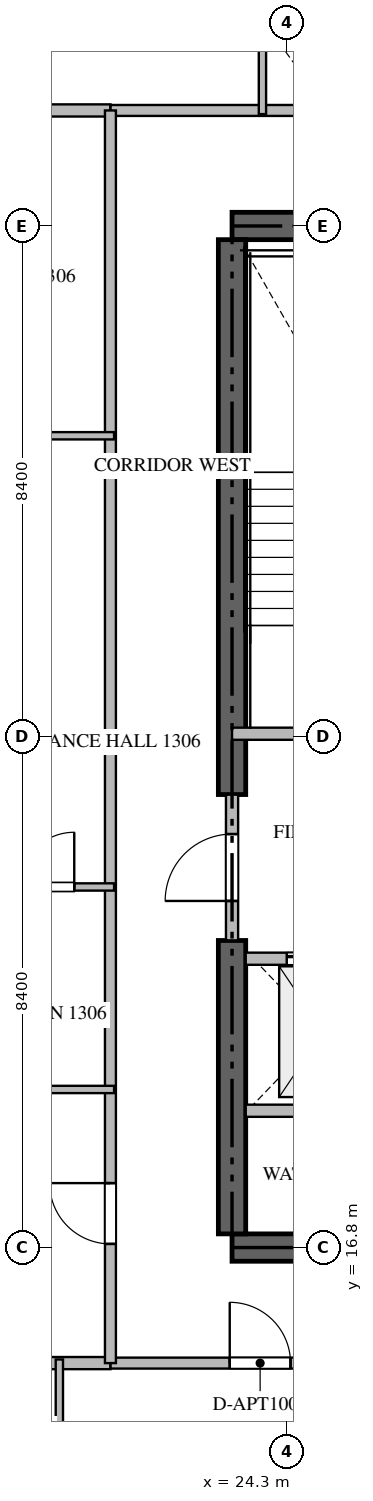
"""IFC4 building model, lengths in metres.
Left out: names, types, materials, properties, quantities, classifications, styles, units other than length and angle.
Written with IfcOpenShell. Run it as: python <this file> out.ifc"""

import sys

from ifc_helpers import new_model, si_unit, direction, frame, frame_2d, origin, place, context, subcontext, project, spatial, rectangle, extrude, source, transform, mapped, element, fill, save


model = new_model("IFC4")
c1 = context("Model", 3, precision=1e-05, world=origin(), true_north=direction((0.0, 1.0)))
c2 = subcontext(c1, "Body", "Model", "MODEL_VIEW")
j1 = project(units=[si_unit("LENGTHUNIT", "METRE"), si_unit("PLANEANGLEUNIT", "RADIAN")], contexts=[c1])
p1 = place(None, origin())
s1 = spatial("IfcSite", under=j1, at=p1, CompositionType="ELEMENT")
p2 = place(p1, origin())
s2 = spatial("IfcBuilding", under=s1, at=p2, CompositionType="ELEMENT")
p3 = place(p2, frame((0.0, 0.0, 56.7)))
s3 = spatial("IfcBuildingStorey", under=s2, at=p3, CompositionType="ELEMENT", Elevation=56.7)
for number, where, z_axis, x_axis in (
    (1, (23.4, 16.8, -0.26), (0.0, 0.0, 1.0), (1.0, 0.0, 0.0)),
    (2, (41.4, 33.6, -0.26), (0.0, 0.0, 1.0), (-1.0, 0.0, 0.0)),
):
    element("IfcWall", number, at=place(p3, frame(where, z_axis=z_axis, x_axis=x_axis)), inside=s3, PredefinedType="SHEAR", context=c2, shape_type="SweptSolid", body=[
        extrude(rectangle(XDim=18.0, YDim=0.45, at=frame_2d((9.0, 0.0))), origin(), (0.0, 0.0, 1.0), 3.748),
    ])
p4 = place(p3, frame((23.4, 17.025, -0.26), z_axis=(0.0, 0.0, 1.0), x_axis=(0.0, 1.0, 0.0)))
e3 = element("IfcWall", 3, at=p4, inside=s3, PredefinedType="SHEAR", context=c2, shape_type="SweptSolid", body=[
    extrude(rectangle(XDim=4.825, YDim=0.45, at=frame_2d((2.413, 0.0))), origin(), (0.0, 0.0, 1.0), 3.748),
])
p5 = place(p3, frame((23.4, 24.25, -0.26), z_axis=(0.0, 0.0, 1.0), x_axis=(0.0, 1.0, 0.0)))
e4 = element("IfcWall", 4, at=p5, inside=s3, PredefinedType="SHEAR", context=c2, shape_type="SweptSolid", body=[
    extrude(rectangle(XDim=9.125, YDim=0.45, at=frame_2d((4.562, 0.0))), origin(), (0.0, 0.0, 1.0), 3.748),
])
p6 = place(p3, frame((23.4, 25.25, 0.0), z_axis=(0.0, 0.0, 1.0), x_axis=(1.0, 0.0, 0.0)))
e5 = element("IfcWall", 5, at=p6, inside=s3, PredefinedType="STANDARD", context=c2, shape_type="SweptSolid", body=[
    extrude(rectangle(XDim=4.45, YDim=0.2, at=frame_2d((2.225, 0.0))), origin(), (0.0, 0.0, 1.0), 3.49),
])
p7 = place(p6, frame((1.65, 0.0, 0.0)))
e6 = element("IfcOpeningElement", 6, at=p7, cuts=e5, PredefinedType="OPENING", context=c2, shape_type="SweptSolid", body=[
    extrude(rectangle(XDim=1.1, YDim=2.15, at=frame_2d((0.55, 1.075))), frame((0.0, 0.11, 0.0), z_axis=(0.0, -1.0, 0.0), x_axis=(1.0, 0.0, 0.0)), (0.0, 0.0, 1.0), 0.22),
])
p8 = place(p3, frame((23.625, 21.55, 0.0), z_axis=(0.0, 0.0, 1.0), x_axis=(1.0, 0.0, 0.0)))
e7 = element("IfcWall", 7, at=p8, inside=s3, PredefinedType="STANDARD", context=c2, shape_type="SweptSolid", body=[
    extrude(rectangle(XDim=2.425, YDim=0.2, at=frame_2d((1.212, 0.0))), origin(), (0.0, 0.0, 1.0), 3.49),
])
p9 = place(p8, frame((0.675, 0.0, 0.0)))
e8 = element("IfcOpeningElement", 8, at=p9, cuts=e7, PredefinedType="OPENING", context=c2, shape_type="SweptSolid", body=[
    extrude(rectangle(XDim=1.2, YDim=2.2, at=frame_2d((0.6, 1.1))), frame((0.0, 0.11, 0.0), z_axis=(0.0, -1.0, 0.0), x_axis=(1.0, 0.0, 0.0)), (0.0, 0.0, 1.0), 0.22),
])
p10 = place(p3, frame((23.625, 19.05, 0.0), z_axis=(0.0, 0.0, 1.0), x_axis=(1.0, 0.0, 0.0)))
e9 = element("IfcWall", 9, at=p10, inside=s3, PredefinedType="STANDARD", context=c2, shape_type="SweptSolid", body=[
    extrude(rectangle(XDim=2.425, YDim=0.2, at=frame_2d((1.212, 0.0))), origin(), (0.0, 0.0, 1.0), 3.49),
])
p11 = place(p3, frame((23.4, 21.852, 0.0), z_axis=(0.0, 0.0, 1.0), x_axis=(0.0, 1.0, 0.0)))
e10 = element("IfcWall", 10, at=p11, inside=s3, PredefinedType="STANDARD", context=c2, shape_type="SweptSolid", body=[
    extrude(rectangle(XDim=2.396, YDim=0.2, at=frame_2d((1.198, 0.0))), origin(), (0.0, 0.0, 1.0), 3.49),
])
p12 = place(p11, frame((0.648, 0.0, 0.0)))
e11 = element("IfcOpeningElement", 11, at=p12, cuts=e10, PredefinedType="OPENING", context=c2, shape_type="SweptSolid", body=[
    extrude(rectangle(XDim=1.1, YDim=2.15, at=frame_2d((0.55, 1.075))), frame((0.0, 0.11, 0.0), z_axis=(0.0, -1.0, 0.0), x_axis=(1.0, 0.0, 0.0)), (0.0, 0.0, 1.0), 0.22),
])
for number, where, z_axis, x_axis in (
    (12, (6.082, 14.9, 0.0), (0.0, 0.0, 1.0), (1.0, 0.0, 0.0)),
    (13, (6.082, 35.5, 0.0), (0.0, 0.0, 1.0), (1.0, 0.0, 0.0)),
):
    element("IfcWall", number, at=place(p3, frame(where, z_axis=z_axis, x_axis=x_axis)), inside=s3, PredefinedType="PARTITIONING", context=c2, shape_type="SweptSolid", body=[
        extrude(rectangle(XDim=15.318, YDim=0.2, at=frame_2d((7.659, 0.0))), origin(), (0.0, 0.0, 1.0), 3.49),
    ])
p13 = place(p3, frame((21.402, 14.9, 0.0), z_axis=(0.0, 0.0, 1.0), x_axis=(1.0, 0.0, 0.0)))
e14 = element("IfcWall", 14, at=p13, inside=s3, PredefinedType="PARTITIONING", context=c2, shape_type="SweptSolid", body=[
    extrude(rectangle(XDim=21.996, YDim=0.18, at=frame_2d((10.998, 0.0))), origin(), (0.0, 0.0, 1.0), 3.49),
])
p14 = place(p13, frame((1.96, 0.0, 0.0)))
e15 = element("IfcOpeningElement", 15, at=p14, cuts=e14, PredefinedType="OPENING", context=c2, shape_type="SweptSolid", body=[
    extrude(rectangle(XDim=1.0, YDim=2.15, at=frame_2d((0.5, 1.075))), frame((0.0, 0.1, 0.0), z_axis=(0.0, -1.0, 0.0), x_axis=(1.0, 0.0, 0.0)), (0.0, 0.0, 1.0), 0.2),
])
p15 = place(p13, frame((5.249, 0.0, 0.0)))
e16 = element("IfcOpeningElement", 16, at=p15, cuts=e14, PredefinedType="OPENING", context=c2, shape_type="SweptSolid", body=[
    extrude(rectangle(XDim=1.0, YDim=2.15, at=frame_2d((0.5, 1.075))), frame((0.0, 0.1, 0.0), z_axis=(0.0, -1.0, 0.0), x_axis=(1.0, 0.0, 0.0)), (0.0, 0.0, 1.0), 0.2),
])
p16 = place(p13, frame((11.653, 0.0, 0.0)))
e17 = element("IfcOpeningElement", 17, at=p16, cuts=e14, PredefinedType="OPENING", context=c2, shape_type="SweptSolid", body=[
    extrude(rectangle(XDim=1.0, YDim=2.15, at=frame_2d((0.5, 1.075))), frame((0.0, 0.1, 0.0), z_axis=(0.0, -1.0, 0.0), x_axis=(1.0, 0.0, 0.0)), (0.0, 0.0, 1.0), 0.2),
])
p17 = place(p13, frame((18.896, 0.0, 0.0)))
e18 = element("IfcOpeningElement", 18, at=p17, cuts=e14, PredefinedType="OPENING", context=c2, shape_type="SweptSolid", body=[
    extrude(rectangle(XDim=1.0, YDim=2.15, at=frame_2d((0.5, 1.075))), frame((0.0, 0.1, 0.0), z_axis=(0.0, -1.0, 0.0), x_axis=(1.0, 0.0, 0.0)), (0.0, 0.0, 1.0), 0.2),
])
p18 = place(p3, frame((21.402, 35.5, 0.0), z_axis=(0.0, 0.0, 1.0), x_axis=(1.0, 0.0, 0.0)))
e19 = element("IfcWall", 19, at=p18, inside=s3, PredefinedType="PARTITIONING", context=c2, shape_type="SweptSolid", body=[
    extrude(rectangle(XDim=21.996, YDim=0.18, at=frame_2d((10.998, 0.0))), origin(), (0.0, 0.0, 1.0), 3.49),
])
p19 = place(p18, frame((15.222, 0.0, 0.0)))
e20 = element("IfcOpeningElement", 20, at=p19, cuts=e19, PredefinedType="OPENING", context=c2, shape_type="SweptSolid", body=[
    extrude(rectangle(XDim=1.0, YDim=2.15, at=frame_2d((0.5, 1.075))), frame((0.0, 0.1, 0.0), z_axis=(0.0, -1.0, 0.0), x_axis=(1.0, 0.0, 0.0)), (0.0, 0.0, 1.0), 0.2),
])
p20 = place(p3, frame((21.4, 14.9, 0.0), z_axis=(0.0, 0.0, 1.0), x_axis=(0.0, 1.0, 0.0)))
e21 = element("IfcWall", 21, at=p20, inside=s3, PredefinedType="PARTITIONING", context=c2, shape_type="SweptSolid", body=[
    extrude(rectangle(XDim=20.6, YDim=0.18, at=frame_2d((10.3, 0.0))), origin(), (0.0, 0.0, 1.0), 3.49),
])
p21 = place(p20, frame((1.96, 0.0, 0.0)))
e22 = element("IfcOpeningElement", 22, at=p21, cuts=e21, PredefinedType="OPENING", context=c2, shape_type="SweptSolid", body=[
    extrude(rectangle(XDim=1.0, YDim=2.15, at=frame_2d((0.5, 1.075))), frame((0.0, 0.1, 0.0), z_axis=(0.0, -1.0, 0.0), x_axis=(1.0, 0.0, 0.0)), (0.0, 0.0, 1.0), 0.2),
])
p22 = place(p3, frame((20.56, 12.15, 0.0), z_axis=(0.0, 0.0, 1.0), x_axis=(0.0, 1.0, 0.0)))
e23 = element("IfcWall", 23, at=p22, inside=s3, PredefinedType="PARTITIONING", context=c2, shape_type="SweptSolid", body=[
    extrude(rectangle(XDim=2.81, YDim=0.12, at=frame_2d((1.405, 0.0))), origin(), (0.0, 0.0, 1.0), 3.49),
])
p23 = place(p3, frame((23.9, 37.648, 0.0), z_axis=(0.0, 0.0, 1.0), x_axis=(0.0, -1.0, 0.0)))
e24 = element("IfcWall", 24, at=p23, inside=s3, PredefinedType="PARTITIONING", context=c2, shape_type="SweptSolid", body=[
    extrude(rectangle(XDim=2.208, YDim=0.12, at=frame_2d((1.104, 0.0))), origin(), (0.0, 0.0, 1.0), 3.49),
])
p24 = place(p3, frame((18.65, 19.4, 0.0), z_axis=(0.0, 0.0, 1.0), x_axis=(1.0, 0.0, 0.0)))
e25 = element("IfcWall", 25, at=p24, inside=s3, PredefinedType="PARTITIONING", context=c2, shape_type="SweptSolid", body=[
    extrude(rectangle(XDim=2.81, YDim=0.12, at=frame_2d((1.405, 0.0))), origin(), (0.0, 0.0, 1.0), 3.49),
])
p25 = place(p3, frame((19.25, 22.73, 0.0), z_axis=(0.0, 0.0, 1.0), x_axis=(1.0, 0.0, 0.0)))
e26 = element("IfcWall", 26, at=p25, inside=s3, PredefinedType="PARTITIONING", context=c2, shape_type="SweptSolid", body=[
    extrude(rectangle(XDim=2.21, YDim=0.12, at=frame_2d((1.105, 0.0))), origin(), (0.0, 0.0, 1.0), 3.49),
])
p26 = place(p25, frame((0.655, 0.0, 0.0)))
e27 = element("IfcOpeningElement", 27, at=p26, cuts=e26, PredefinedType="OPENING", context=c2, shape_type="SweptSolid", body=[
    extrude(rectangle(XDim=0.9, YDim=2.1, at=frame_2d((0.45, 1.05))), frame((0.0, 0.07, 0.0), z_axis=(0.0, -1.0, 0.0), x_axis=(1.0, 0.0, 0.0)), (0.0, 0.0, 1.0), 0.14),
])
p27 = place(p3, frame((19.252, 30.15, 0.0), z_axis=(0.0, 0.0, 1.0), x_axis=(1.0, 0.0, 0.0)))
e28 = element("IfcWall", 28, at=p27, inside=s3, PredefinedType="PARTITIONING", context=c2, shape_type="SweptSolid", body=[
    extrude(rectangle(XDim=2.208, YDim=0.12, at=frame_2d((1.104, 0.0))), origin(), (0.0, 0.0, 1.0), 3.49),
])
m1 = source(origin(), c2, "Body", "SweptSolid", [
    extrude(rectangle(XDim=1.2, YDim=2.2, at=frame_2d((0.6, 1.1))), frame((0.0, 0.025, 0.0), z_axis=(0.0, -1.0, 0.0), x_axis=(1.0, 0.0, 0.0)), (0.0, 0.0, 1.0), 0.05),
])
p28 = place(p9, origin())
e29 = element("IfcDoor", 29, at=p28, inside=s3, OperationType="DOUBLE_DOOR_SLIDING", PredefinedType="DOOR", context=c2, shape_type="MappedRepresentation", body=[
    mapped(m1, transform((0.0, 0.0, 0.0), scale=1.0)),
])
fill(e8, e29)
m2 = source(origin(), c2, "Body", "SweptSolid", [
    extrude(rectangle(XDim=1.1, YDim=2.15, at=frame_2d((0.55, 1.075))), frame((0.0, 0.025, 0.0), z_axis=(0.0, -1.0, 0.0), x_axis=(1.0, 0.0, 0.0)), (0.0, 0.0, 1.0), 0.05),
])
p29 = place(p12, origin())
e30 = element("IfcDoor", 30, at=p29, inside=s3, OperationType="SINGLE_SWING_LEFT", PredefinedType="DOOR", context=c2, shape_type="MappedRepresentation", body=[
    mapped(m2, transform((0.0, 0.0, 0.0), scale=1.0)),
])
fill(e11, e30)
m3 = source(origin(), c2, "Body", "SweptSolid", [
    extrude(rectangle(XDim=1.0, YDim=2.15, at=frame_2d((0.5, 1.075))), frame((0.0, 0.025, 0.0), z_axis=(0.0, -1.0, 0.0), x_axis=(1.0, 0.0, 0.0)), (0.0, 0.0, 1.0), 0.05),
])
p30 = place(p14, origin())
e31 = element("IfcDoor", 31, at=p30, inside=s3, OperationType="SINGLE_SWING_LEFT", PredefinedType="DOOR", context=c2, shape_type="MappedRepresentation", body=[
    mapped(m3, transform((0.0, 0.0, 0.0), scale=1.0)),
])
fill(e15, e31)
p31 = place(p21, origin())
e32 = element("IfcDoor", 32, at=p31, inside=s3, OperationType="SINGLE_SWING_RIGHT", PredefinedType="DOOR", context=c2, shape_type="MappedRepresentation", body=[
    mapped(m3, transform((0.0, 0.0, 0.0), scale=1.0)),
])
fill(e22, e32)
m4 = source(origin(), c2, "Body", "SweptSolid", [
    extrude(rectangle(XDim=0.9, YDim=2.1, at=frame_2d((0.45, 1.05))), frame((0.0, 0.025, 0.0), z_axis=(0.0, -1.0, 0.0), x_axis=(1.0, 0.0, 0.0)), (0.0, 0.0, 1.0), 0.05),
])
p32 = place(p26, origin())
e33 = element("IfcDoor", 33, at=p32, inside=s3, OperationType="SINGLE_SWING_RIGHT", PredefinedType="DOOR", context=c2, shape_type="MappedRepresentation", body=[
    mapped(m4, transform((0.0, 0.0, 0.0), scale=1.0)),
])
fill(e27, e33)
save(model, sys.argv[1])
